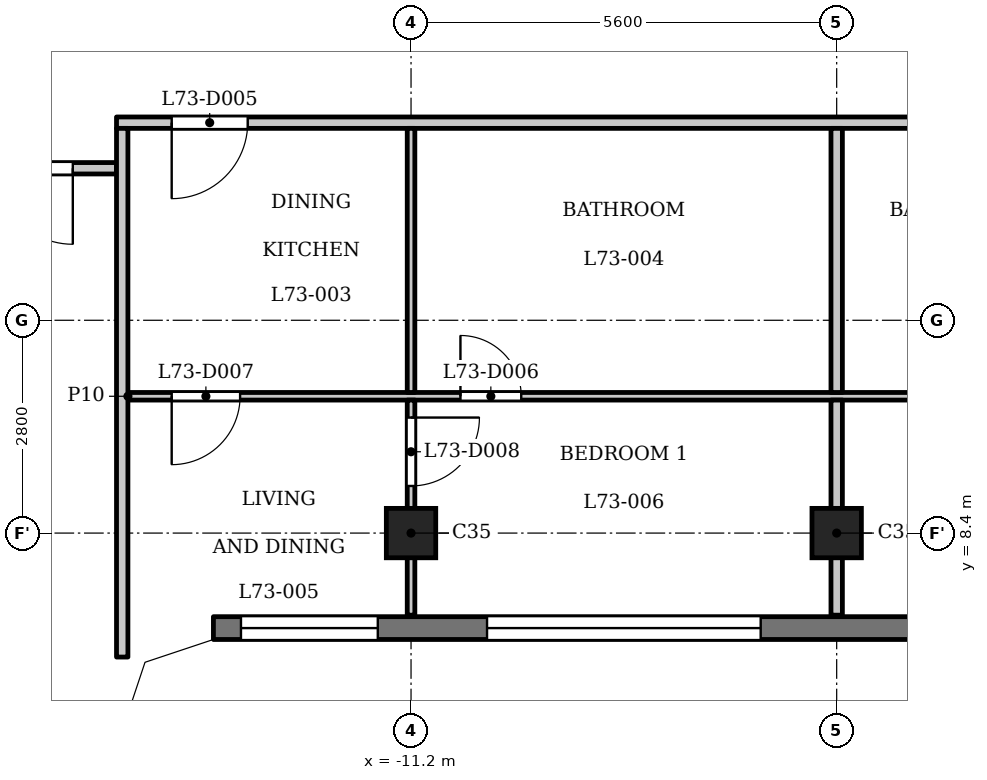
"""IFC4 building model, lengths in metres.
Left out: names, types, materials, properties, quantities, classifications, styles, units other than length and angle.
Written with IfcOpenShell. Run it as: python <this file> out.ifc"""

import sys

from ifc_helpers import new_model, si_unit, direction, frame, frame_2d, origin, origin_2d, place, context, subcontext, project, spatial, polyline, rectangle, outline, extrude, element, fill, save


model = new_model("IFC4")
c1 = context("Model", 3, precision=1e-05, world=origin(), true_north=direction((0.0, 1.0)))
c2 = subcontext(c1, "Body", "Model", "MODEL_VIEW")
j1 = project(units=[si_unit("LENGTHUNIT", "METRE"), si_unit("PLANEANGLEUNIT", "RADIAN")], contexts=[c1])
p1 = place(None, origin())
s1 = spatial("IfcSite", under=j1, at=p1, CompositionType="ELEMENT")
p2 = place(p1, origin())
s2 = spatial("IfcBuilding", under=s1, at=p2, CompositionType="ELEMENT")
p3 = place(p2, frame((0.0, 0.0, 280.2)))
s3 = spatial("IfcBuildingStorey", under=s2, at=p3, CompositionType="ELEMENT", Elevation=280.2)
for number, where, z_axis, x_axis in (
    (1, (-11.2, 8.4, 0.0), (0.0, 0.0, 1.0), (1.0, 0.0, 0.0)),
    (2, (-5.6, 8.4, 0.0), (0.0, 0.0, 1.0), (1.0, 0.0, 0.0)),
):
    element("IfcColumn", number, at=place(p3, frame(where, z_axis=z_axis, x_axis=x_axis)), inside=s3, PredefinedType="COLUMN", context=c2, shape_type="SweptSolid", body=[
        extrude(rectangle(XDim=0.65, YDim=0.65, at=origin_2d()), origin(), (0.0, 0.0, 1.0), 3.5),
    ])
p4 = place(p3, frame((-13.8, 7.15, 0.0), z_axis=(0.0, 0.0, 1.0), x_axis=(1.0, 0.0, 0.0)))
e3 = element("IfcWall", 3, at=p4, inside=s3, PredefinedType="SOLIDWALL", context=c2, shape_type="SweptSolid", body=[
    extrude(rectangle(XDim=27.6, YDim=0.3, at=frame_2d((13.8, 0.0))), origin(), (0.0, 0.0, 1.0), 3.15),
])
p5 = place(p4, frame((0.363, 0.0, 0.9)))
e4 = element("IfcOpeningElement", 4, at=p5, cuts=e3, PredefinedType="OPENING", context=c2, shape_type="SweptSolid", body=[
    extrude(rectangle(XDim=1.8, YDim=1.25, at=frame_2d((0.9, 0.625))), frame((0.0, 0.16, 0.0), z_axis=(0.0, -1.0, 0.0), x_axis=(1.0, 0.0, 0.0)), (0.0, 0.0, 1.0), 0.32),
])
p6 = place(p4, frame((3.6, 0.0, 1.2)))
e5 = element("IfcOpeningElement", 5, at=p6, cuts=e3, PredefinedType="OPENING", context=c2, shape_type="SweptSolid", body=[
    extrude(rectangle(XDim=3.6, YDim=0.95, at=frame_2d((1.8, 0.475))), frame((0.0, 0.16, 0.0), z_axis=(0.0, -1.0, 0.0), x_axis=(1.0, 0.0, 0.0)), (0.0, 0.0, 1.0), 0.32),
])
p7 = place(p4, frame((9.2, 0.0, 1.2)))
e6 = element("IfcOpeningElement", 6, at=p7, cuts=e3, PredefinedType="OPENING", context=c2, shape_type="SweptSolid", body=[
    extrude(rectangle(XDim=3.6, YDim=0.95, at=frame_2d((1.8, 0.475))), frame((0.0, 0.16, 0.0), z_axis=(0.0, -1.0, 0.0), x_axis=(1.0, 0.0, 0.0)), (0.0, 0.0, 1.0), 0.32),
])
p8 = place(p4, frame((14.2, 0.0, 0.9)))
e7 = element("IfcOpeningElement", 7, at=p8, cuts=e3, PredefinedType="OPENING", context=c2, shape_type="SweptSolid", body=[
    extrude(rectangle(XDim=1.8, YDim=1.25, at=frame_2d((0.9, 0.625))), frame((0.0, 0.16, 0.0), z_axis=(0.0, -1.0, 0.0), x_axis=(1.0, 0.0, 0.0)), (0.0, 0.0, 1.0), 0.32),
])
p9 = place(p4, frame((17.0, 0.0, 0.9)))
e8 = element("IfcOpeningElement", 8, at=p9, cuts=e3, PredefinedType="OPENING", context=c2, shape_type="SweptSolid", body=[
    extrude(rectangle(XDim=1.8, YDim=1.25, at=frame_2d((0.9, 0.625))), frame((0.0, 0.16, 0.0), z_axis=(0.0, -1.0, 0.0), x_axis=(1.0, 0.0, 0.0)), (0.0, 0.0, 1.0), 0.32),
])
p10 = place(p4, frame((20.4, 0.0, 1.2)))
e9 = element("IfcOpeningElement", 9, at=p10, cuts=e3, PredefinedType="OPENING", context=c2, shape_type="SweptSolid", body=[
    extrude(rectangle(XDim=3.6, YDim=0.95, at=frame_2d((1.8, 0.475))), frame((0.0, 0.16, 0.0), z_axis=(0.0, -1.0, 0.0), x_axis=(1.0, 0.0, 0.0)), (0.0, 0.0, 1.0), 0.32),
])
p11 = place(p4, frame((25.438, 0.0, 0.9)))
e10 = element("IfcOpeningElement", 10, at=p11, cuts=e3, PredefinedType="OPENING", context=c2, shape_type="SweptSolid", body=[
    extrude(rectangle(XDim=1.8, YDim=1.25, at=frame_2d((0.9, 0.625))), frame((0.0, 0.16, 0.0), z_axis=(0.0, -1.0, 0.0), x_axis=(1.0, 0.0, 0.0)), (0.0, 0.0, 1.0), 0.32),
])
p12 = place(p3, frame((-14.925, 10.2, 0.0), z_axis=(0.0, 0.0, 1.0), x_axis=(1.0, 0.0, 0.0)))
e11 = element("IfcWall", 11, at=p12, inside=s3, PredefinedType="PARTITIONING", context=c2, shape_type="SweptSolid", body=[
    extrude(rectangle(XDim=29.85, YDim=0.1, at=frame_2d((14.925, 0.0))), origin(), (0.0, 0.0, 1.0), 3.15),
])
p13 = place(p12, frame((4.375, 0.0, 0.0)))
e12 = element("IfcOpeningElement", 12, at=p13, cuts=e11, PredefinedType="OPENING", context=c2, shape_type="SweptSolid", body=[
    extrude(rectangle(XDim=0.8, YDim=2.1, at=frame_2d((0.4, 1.05))), frame((0.0, 0.06, 0.0), z_axis=(0.0, -1.0, 0.0), x_axis=(1.0, 0.0, 0.0)), (0.0, 0.0, 1.0), 0.12),
])
p14 = place(p12, frame((0.576, 0.0, 0.0)))
e13 = element("IfcOpeningElement", 13, at=p14, cuts=e11, PredefinedType="OPENING", context=c2, shape_type="SweptSolid", body=[
    extrude(rectangle(XDim=0.9, YDim=2.1, at=frame_2d((0.45, 1.05))), frame((0.0, 0.06, 0.0), z_axis=(0.0, -1.0, 0.0), x_axis=(1.0, 0.0, 0.0)), (0.0, 0.0, 1.0), 0.12),
])
p15 = place(p12, frame((10.875, 0.0, 0.0)))
e14 = element("IfcOpeningElement", 14, at=p15, cuts=e11, PredefinedType="OPENING", context=c2, shape_type="SweptSolid", body=[
    extrude(rectangle(XDim=0.8, YDim=2.1, at=frame_2d((0.4, 1.05))), frame((0.0, 0.06, 0.0), z_axis=(0.0, -1.0, 0.0), x_axis=(1.0, 0.0, 0.0)), (0.0, 0.0, 1.0), 0.12),
])
p16 = place(p12, frame((12.725, 0.0, 0.0)))
e15 = element("IfcOpeningElement", 15, at=p16, cuts=e11, PredefinedType="OPENING", context=c2, shape_type="SweptSolid", body=[
    extrude(rectangle(XDim=0.9, YDim=2.1, at=frame_2d((0.45, 1.05))), frame((0.0, 0.06, 0.0), z_axis=(0.0, -1.0, 0.0), x_axis=(1.0, 0.0, 0.0)), (0.0, 0.0, 1.0), 0.12),
])
p17 = place(p12, frame((16.075, 0.0, 0.0)))
e16 = element("IfcOpeningElement", 16, at=p17, cuts=e11, PredefinedType="OPENING", context=c2, shape_type="SweptSolid", body=[
    extrude(rectangle(XDim=0.9, YDim=2.1, at=frame_2d((0.45, 1.05))), frame((0.0, 0.06, 0.0), z_axis=(0.0, -1.0, 0.0), x_axis=(1.0, 0.0, 0.0)), (0.0, 0.0, 1.0), 0.12),
])
p18 = place(p12, frame((18.925, 0.0, 0.0)))
e17 = element("IfcOpeningElement", 17, at=p18, cuts=e11, PredefinedType="OPENING", context=c2, shape_type="SweptSolid", body=[
    extrude(rectangle(XDim=0.9, YDim=2.1, at=frame_2d((0.45, 1.05))), frame((0.0, 0.06, 0.0), z_axis=(0.0, -1.0, 0.0), x_axis=(1.0, 0.0, 0.0)), (0.0, 0.0, 1.0), 0.12),
])
p19 = place(p12, frame((26.724, 0.0, 0.0)))
e18 = element("IfcOpeningElement", 18, at=p19, cuts=e11, PredefinedType="OPENING", context=c2, shape_type="SweptSolid", body=[
    extrude(rectangle(XDim=0.8, YDim=2.1, at=frame_2d((0.4, 1.05))), frame((0.0, 0.06, 0.0), z_axis=(0.0, -1.0, 0.0), x_axis=(1.0, 0.0, 0.0)), (0.0, 0.0, 1.0), 0.12),
])
p20 = place(p12, frame((21.175, 0.0, 0.0)))
e19 = element("IfcOpeningElement", 19, at=p20, cuts=e11, PredefinedType="OPENING", context=c2, shape_type="SweptSolid", body=[
    extrude(rectangle(XDim=0.9, YDim=2.1, at=frame_2d((0.45, 1.05))), frame((0.0, 0.06, 0.0), z_axis=(0.0, -1.0, 0.0), x_axis=(1.0, 0.0, 0.0)), (0.0, 0.0, 1.0), 0.12),
])
p21 = place(p3, frame((-17.4, 13.2, 0.0), z_axis=(0.0, 0.0, 1.0), x_axis=(1.0, 0.0, 0.0)))
e20 = element("IfcWall", 20, at=p21, inside=s3, PredefinedType="PARTITIONING", context=c2, shape_type="SweptSolid", body=[
    extrude(rectangle(XDim=2.325, YDim=0.15, at=frame_2d((1.163, 0.0))), origin(), (0.0, 0.0, 1.0), 3.15),
])
p22 = place(p21, frame((0.75, 0.0, 0.0)))
e21 = element("IfcOpeningElement", 21, at=p22, cuts=e20, PredefinedType="OPENING", context=c2, shape_type="SweptSolid", body=[
    extrude(rectangle(XDim=1.0, YDim=2.1, at=frame_2d((0.5, 1.05))), frame((0.0, 0.085, 0.0), z_axis=(0.0, -1.0, 0.0), x_axis=(1.0, 0.0, 0.0)), (0.0, 0.0, 1.0), 0.17),
])
p23 = place(p3, frame((-15.075, 13.8, 0.0), z_axis=(0.0, 0.0, 1.0), x_axis=(1.0, 0.0, 0.0)))
e22 = element("IfcWall", 22, at=p23, inside=s3, PredefinedType="PARTITIONING", context=c2, shape_type="SweptSolid", body=[
    extrude(rectangle(XDim=30.15, YDim=0.15, at=frame_2d((15.075, 0.0))), origin(), (0.0, 0.0, 1.0), 3.15),
])
p24 = place(p23, frame((0.726, 0.0, 0.0)))
e23 = element("IfcOpeningElement", 23, at=p24, cuts=e22, PredefinedType="OPENING", context=c2, shape_type="SweptSolid", body=[
    extrude(rectangle(XDim=1.0, YDim=2.1, at=frame_2d((0.5, 1.05))), frame((0.0, 0.085, 0.0), z_axis=(0.0, -1.0, 0.0), x_axis=(1.0, 0.0, 0.0)), (0.0, 0.0, 1.0), 0.17),
])
p25 = place(p23, frame((15.725, 0.0, 0.0)))
e24 = element("IfcOpeningElement", 24, at=p25, cuts=e22, PredefinedType="OPENING", context=c2, shape_type="SweptSolid", body=[
    extrude(rectangle(XDim=1.0, YDim=2.1, at=frame_2d((0.5, 1.05))), frame((0.0, 0.085, 0.0), z_axis=(0.0, -1.0, 0.0), x_axis=(1.0, 0.0, 0.0)), (0.0, 0.0, 1.0), 0.17),
])
p26 = place(p23, frame((21.325, 0.0, 0.0)))
e25 = element("IfcOpeningElement", 25, at=p26, cuts=e22, PredefinedType="OPENING", context=c2, shape_type="SweptSolid", body=[
    extrude(rectangle(XDim=1.0, YDim=2.1, at=frame_2d((0.5, 1.05))), frame((0.0, 0.085, 0.0), z_axis=(0.0, -1.0, 0.0), x_axis=(1.0, 0.0, 0.0)), (0.0, 0.0, 1.0), 0.17),
])
p27 = place(p3, frame((-15.0, 6.769, 0.0), z_axis=(0.0, 0.0, 1.0), x_axis=(0.0, 1.0, 0.0)))
e26 = element("IfcWall", 26, at=p27, inside=s3, PredefinedType="PARTITIONING", context=c2, shape_type="SweptSolid", body=[
    extrude(rectangle(XDim=6.956, YDim=0.15, at=frame_2d((3.478, 0.0))), origin(), (0.0, 0.0, 1.0), 3.15),
])
p28 = place(p3, frame((-11.2, 7.32, 0.0), z_axis=(0.0, 0.0, 1.0), x_axis=(0.0, 1.0, 0.0)))
e27 = element("IfcWall", 27, at=p28, inside=s3, PredefinedType="PARTITIONING", context=c2, shape_type="SweptSolid", body=[
    extrude(rectangle(XDim=2.83, YDim=0.1, at=frame_2d((1.415, 0.0))), origin(), (0.0, 0.0, 1.0), 3.15),
])
p29 = place(p28, frame((1.7, 0.0, 0.0)))
e28 = element("IfcOpeningElement", 28, at=p29, cuts=e27, PredefinedType="OPENING", context=c2, shape_type="SweptSolid", body=[
    extrude(rectangle(XDim=0.9, YDim=2.1, at=frame_2d((0.45, 1.05))), frame((0.0, 0.06, 0.0), z_axis=(0.0, -1.0, 0.0), x_axis=(1.0, 0.0, 0.0)), (0.0, 0.0, 1.0), 0.12),
])
p30 = place(p3, frame((-11.2, 10.25, 0.0), z_axis=(0.0, 0.0, 1.0), x_axis=(0.0, 1.0, 0.0)))
e29 = element("IfcWall", 29, at=p30, inside=s3, PredefinedType="PARTITIONING", context=c2, shape_type="SweptSolid", body=[
    extrude(rectangle(XDim=3.475, YDim=0.1, at=frame_2d((1.738, 0.0))), origin(), (0.0, 0.0, 1.0), 3.15),
])
p31 = place(p3, frame((-5.6, 7.32, 0.0), z_axis=(0.0, 0.0, 1.0), x_axis=(0.0, 1.0, 0.0)))
e30 = element("IfcWall", 30, at=p31, inside=s3, PredefinedType="PARTITIONING", context=c2, shape_type="SweptSolid", body=[
    extrude(rectangle(XDim=2.83, YDim=0.15, at=frame_2d((1.415, 0.0))), origin(), (0.0, 0.0, 1.0), 3.15),
])
p32 = place(p3, frame((-5.6, 10.25, 0.0), z_axis=(0.0, 0.0, 1.0), x_axis=(0.0, 1.0, 0.0)))
e31 = element("IfcWall", 31, at=p32, inside=s3, PredefinedType="PARTITIONING", context=c2, shape_type="SweptSolid", body=[
    extrude(rectangle(XDim=3.475, YDim=0.15, at=frame_2d((1.738, 0.0))), origin(), (0.0, 0.0, 1.0), 3.15),
])
p33 = place(p3, origin())
e32 = element("IfcWall", 32, at=p33, inside=s3, PredefinedType="SOLIDWALL", context=c2, shape_type="SweptSolid", body=[
    extrude(outline(polyline([(-13.849, 7.3), (-14.937, 6.937), (-15.3, 5.849), (-15.3, 5.8), (-15.0, 5.8), (-14.7, 6.7), (-13.8, 7.0), (-13.8, 7.3), (-13.849, 7.3)])), origin(), (0.0, 0.0, 1.0), 3.15),
])
p34 = place(p22, origin())
e33 = element("IfcDoor", 33, at=p34, inside=s3, OperationType="SINGLE_SWING_RIGHT", PredefinedType="DOOR", context=c2, shape_type="SweptSolid", body=[
    extrude(rectangle(XDim=1.0, YDim=2.1, at=frame_2d((0.5, 1.05))), frame((0.0, 0.025, 0.0), z_axis=(0.0, -1.0, 0.0), x_axis=(1.0, 0.0, 0.0)), (0.0, 0.0, 1.0), 0.05),
])
fill(e21, e33)
p35 = place(p24, origin())
e34 = element("IfcDoor", 34, at=p35, inside=s3, OperationType="SINGLE_SWING_LEFT", PredefinedType="DOOR", context=c2, shape_type="SweptSolid", body=[
    extrude(rectangle(XDim=1.0, YDim=2.1, at=frame_2d((0.5, 1.05))), frame((0.0, 0.025, 0.0), z_axis=(0.0, -1.0, 0.0), x_axis=(1.0, 0.0, 0.0)), (0.0, 0.0, 1.0), 0.05),
])
fill(e23, e34)
p36 = place(p13, origin())
e35 = element("IfcDoor", 35, at=p36, inside=s3, OperationType="SINGLE_SWING_RIGHT", PredefinedType="DOOR", context=c2, shape_type="SweptSolid", body=[
    extrude(rectangle(XDim=0.8, YDim=2.1, at=frame_2d((0.4, 1.05))), frame((0.0, 0.025, 0.0), z_axis=(0.0, -1.0, 0.0), x_axis=(1.0, 0.0, 0.0)), (0.0, 0.0, 1.0), 0.05),
])
fill(e12, e35)
p37 = place(p14, origin())
e36 = element("IfcDoor", 36, at=p37, inside=s3, OperationType="SINGLE_SWING_LEFT", PredefinedType="DOOR", context=c2, shape_type="SweptSolid", body=[
    extrude(rectangle(XDim=0.9, YDim=2.1, at=frame_2d((0.45, 1.05))), frame((0.0, 0.025, 0.0), z_axis=(0.0, -1.0, 0.0), x_axis=(1.0, 0.0, 0.0)), (0.0, 0.0, 1.0), 0.05),
])
fill(e13, e36)
p38 = place(p29, origin())
e37 = element("IfcDoor", 37, at=p38, inside=s3, OperationType="SINGLE_SWING_RIGHT", PredefinedType="DOOR", context=c2, shape_type="SweptSolid", body=[
    extrude(rectangle(XDim=0.9, YDim=2.1, at=frame_2d((0.45, 1.05))), frame((0.0, 0.025, 0.0), z_axis=(0.0, -1.0, 0.0), x_axis=(1.0, 0.0, 0.0)), (0.0, 0.0, 1.0), 0.05),
])
fill(e28, e37)
p39 = place(p5, origin())
e38 = element("IfcWindow", 38, at=p39, inside=s3, PartitioningType="SINGLE_PANEL", PredefinedType="WINDOW", context=c2, shape_type="SweptSolid", body=[
    extrude(rectangle(XDim=1.8, YDim=1.25, at=frame_2d((0.9, 0.625))), frame((0.0, 0.03, 0.0), z_axis=(0.0, -1.0, 0.0), x_axis=(1.0, 0.0, 0.0)), (0.0, 0.0, 1.0), 0.06),
])
fill(e4, e38)
p40 = place(p6, origin())
e39 = element("IfcWindow", 39, at=p40, inside=s3, PartitioningType="SINGLE_PANEL", PredefinedType="WINDOW", context=c2, shape_type="SweptSolid", body=[
    extrude(rectangle(XDim=3.6, YDim=0.95, at=frame_2d((1.8, 0.475))), frame((0.0, 0.03, 0.0), z_axis=(0.0, -1.0, 0.0), x_axis=(1.0, 0.0, 0.0)), (0.0, 0.0, 1.0), 0.06),
])
fill(e5, e39)
save(model, sys.argv[1])
